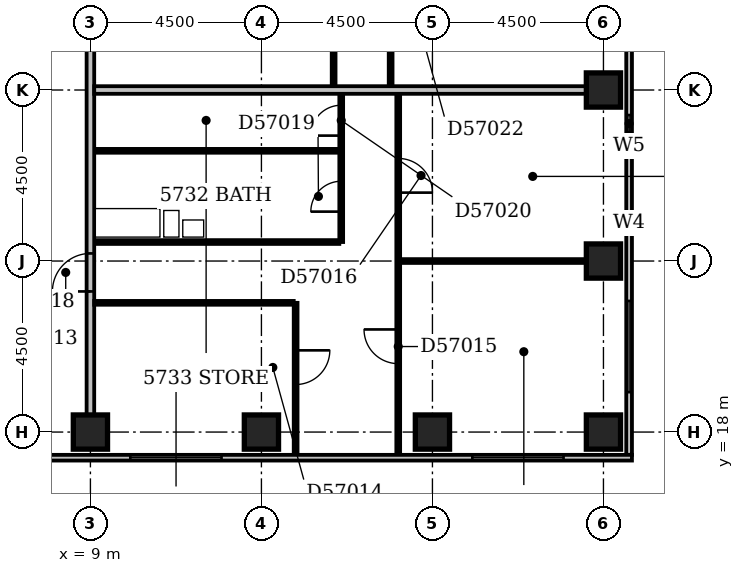
"""IFC4 building model, lengths in metres.
Left out: names, types, materials, properties, quantities, classifications, styles, units other than length and angle.
Written with IfcOpenShell. Run it as: python <this file> out.ifc"""

import sys

from ifc_helpers import new_model, si_unit, direction, frame, frame_2d, origin, origin_2d, place, context, subcontext, project, spatial, rectangle, extrude, element, fill, save


model = new_model("IFC4")
c1 = context("Model", 3, precision=1e-05, world=origin(), true_north=direction((0.0, 1.0)))
c2 = subcontext(c1, "Body", "Model", "MODEL_VIEW")
j1 = project(units=[si_unit("LENGTHUNIT", "METRE"), si_unit("PLANEANGLEUNIT", "RADIAN")], contexts=[c1])
p1 = place(None, origin())
s1 = spatial("IfcSite", under=j1, at=p1, CompositionType="ELEMENT")
p2 = place(p1, origin())
s2 = spatial("IfcBuilding", under=s1, at=p2, CompositionType="ELEMENT")
p3 = place(p2, frame((0.0, 0.0, 222.2)))
s3 = spatial("IfcBuildingStorey", under=s2, at=p3, CompositionType="ELEMENT", Elevation=222.2)
for number, where, z_axis, x_axis in (
    (1, (9.0, 18.0, -0.3), (0.0, 0.0, 1.0), (1.0, 0.0, 0.0)),
    (2, (13.5, 18.0, -0.3), (0.0, 0.0, 1.0), (1.0, 0.0, 0.0)),
    (3, (18.0, 18.0, -0.3), (0.0, 0.0, 1.0), (1.0, 0.0, 0.0)),
    (4, (22.5, 18.0, -0.3), (0.0, 0.0, 1.0), (1.0, 0.0, 0.0)),
    (5, (22.5, 22.5, -0.3), (0.0, 0.0, 1.0), (1.0, 0.0, 0.0)),
    (6, (22.5, 27.0, -0.3), (0.0, 0.0, 1.0), (1.0, 0.0, 0.0)),
):
    element("IfcColumn", number, at=place(p3, frame(where, z_axis=z_axis, x_axis=x_axis)), inside=s3, PredefinedType="COLUMN", context=c2, shape_type="SweptSolid", body=[
        extrude(rectangle(XDim=0.9, YDim=0.9, at=origin_2d()), origin(), (0.0, 0.0, 1.0), 3.6),
    ])
p4 = place(p3, frame((3.9, 17.325, 0.0), z_axis=(0.0, 0.0, 1.0), x_axis=(1.0, 0.0, 0.0)))
e7 = element("IfcWall", 7, at=p4, inside=s3, PredefinedType="STANDARD", context=c2, shape_type="SweptSolid", body=[
    extrude(rectangle(XDim=19.35, YDim=0.15, at=frame_2d((9.675, 0.0))), origin(), (0.0, 0.0, 1.0), 2.7),
])
p5 = place(p4, frame((6.15, 0.0, 0.6)))
e8 = element("IfcOpeningElement", 8, at=p5, cuts=e7, PredefinedType="OPENING", context=c2, shape_type="SweptSolid", body=[
    extrude(rectangle(XDim=2.4, YDim=1.8, at=frame_2d((1.2, 0.9))), frame((0.0, 0.087, 0.0), z_axis=(0.0, -1.0, 0.0), x_axis=(1.0, 0.0, 0.0)), (0.0, 0.0, 1.0), 0.174),
])
p6 = place(p4, frame((15.15, 0.0, 0.6)))
e9 = element("IfcOpeningElement", 9, at=p6, cuts=e7, PredefinedType="OPENING", context=c2, shape_type="SweptSolid", body=[
    extrude(rectangle(XDim=2.4, YDim=1.8, at=frame_2d((1.2, 0.9))), frame((0.0, 0.087, 0.0), z_axis=(0.0, -1.0, 0.0), x_axis=(1.0, 0.0, 0.0)), (0.0, 0.0, 1.0), 0.174),
])
p7 = place(p3, frame((23.175, 17.4, 0.0), z_axis=(0.0, 0.0, 1.0), x_axis=(0.0, 1.0, 0.0)))
e10 = element("IfcWall", 10, at=p7, inside=s3, PredefinedType="STANDARD", context=c2, shape_type="SweptSolid", body=[
    extrude(rectangle(XDim=17.85, YDim=0.15, at=frame_2d((8.925, 0.0))), origin(), (0.0, 0.0, 1.0), 2.7),
])
p8 = place(p7, frame((1.65, 0.0, 0.6)))
e11 = element("IfcOpeningElement", 11, at=p8, cuts=e10, PredefinedType="OPENING", context=c2, shape_type="SweptSolid", body=[
    extrude(rectangle(XDim=2.4, YDim=1.8, at=frame_2d((1.2, 0.9))), frame((0.0, 0.087, 0.0), z_axis=(0.0, -1.0, 0.0), x_axis=(1.0, 0.0, 0.0)), (0.0, 0.0, 1.0), 0.174),
])
p9 = place(p7, frame((5.798, 0.0, 0.6)))
e12 = element("IfcOpeningElement", 12, at=p9, cuts=e10, PredefinedType="OPENING", context=c2, shape_type="SweptSolid", body=[
    extrude(rectangle(XDim=0.6, YDim=1.8, at=frame_2d((0.3, 0.9))), frame((0.0, 0.087, 0.0), z_axis=(0.0, -1.0, 0.0), x_axis=(1.0, 0.0, 0.0)), (0.0, 0.0, 1.0), 0.174),
])
p10 = place(p7, frame((8.491, 0.0, 0.6)))
e13 = element("IfcOpeningElement", 13, at=p10, cuts=e10, PredefinedType="OPENING", context=c2, shape_type="SweptSolid", body=[
    extrude(rectangle(XDim=0.45, YDim=1.8, at=frame_2d((0.225, 0.9))), frame((0.0, 0.087, 0.0), z_axis=(0.0, -1.0, 0.0), x_axis=(1.0, 0.0, 0.0)), (0.0, 0.0, 1.0), 0.174),
])
p11 = place(p7, frame((10.65, 0.0, 0.6)))
e14 = element("IfcOpeningElement", 14, at=p11, cuts=e10, PredefinedType="OPENING", context=c2, shape_type="SweptSolid", body=[
    extrude(rectangle(XDim=2.4, YDim=1.8, at=frame_2d((1.2, 0.9))), frame((0.0, 0.087, 0.0), z_axis=(0.0, -1.0, 0.0), x_axis=(1.0, 0.0, 0.0)), (0.0, 0.0, 1.0), 0.174),
])
p12 = place(p7, frame((15.15, 0.0, 0.6)))
e15 = element("IfcOpeningElement", 15, at=p12, cuts=e10, PredefinedType="OPENING", context=c2, shape_type="SweptSolid", body=[
    extrude(rectangle(XDim=2.4, YDim=1.8, at=frame_2d((1.2, 0.9))), frame((0.0, 0.087, 0.0), z_axis=(0.0, -1.0, 0.0), x_axis=(1.0, 0.0, 0.0)), (0.0, 0.0, 1.0), 0.174),
])
p13 = place(p3, frame((14.4, 17.4, 0.0), z_axis=(0.0, 0.0, 1.0), x_axis=(0.0, 1.0, 0.0)))
e16 = element("IfcWall", 16, at=p13, inside=s3, PredefinedType="PARTITIONING", context=c2, shape_type="SweptSolid", body=[
    extrude(rectangle(XDim=4.0, YDim=0.1, at=frame_2d((2.0, 0.0))), origin(), (0.0, 0.0, 1.0), 3.3),
])
p14 = place(p13, frame((1.85, 0.0, 0.0)))
e17 = element("IfcOpeningElement", 17, at=p14, cuts=e16, PredefinedType="OPENING", context=c2, shape_type="SweptSolid", body=[
    extrude(rectangle(XDim=0.9, YDim=2.1, at=frame_2d((0.45, 1.05))), frame((0.0, 0.062, 0.0), z_axis=(0.0, -1.0, 0.0), x_axis=(1.0, 0.0, 0.0)), (0.0, 0.0, 1.0), 0.124),
])
p15 = place(p3, frame((17.1, 17.4, 0.0), z_axis=(0.0, 0.0, 1.0), x_axis=(0.0, 1.0, 0.0)))
e18 = element("IfcWall", 18, at=p15, inside=s3, PredefinedType="PARTITIONING", context=c2, shape_type="SweptSolid", body=[
    extrude(rectangle(XDim=9.5, YDim=0.1, at=frame_2d((4.75, 0.0))), origin(), (0.0, 0.0, 1.0), 3.3),
])
p16 = place(p15, frame((2.4, 0.0, 0.0)))
e19 = element("IfcOpeningElement", 19, at=p16, cuts=e18, PredefinedType="OPENING", context=c2, shape_type="SweptSolid", body=[
    extrude(rectangle(XDim=0.9, YDim=2.1, at=frame_2d((0.45, 1.05))), frame((0.0, 0.062, 0.0), z_axis=(0.0, -1.0, 0.0), x_axis=(1.0, 0.0, 0.0)), (0.0, 0.0, 1.0), 0.124),
])
p17 = place(p15, frame((6.9, 0.0, 0.0)))
e20 = element("IfcOpeningElement", 20, at=p17, cuts=e18, PredefinedType="OPENING", context=c2, shape_type="SweptSolid", body=[
    extrude(rectangle(XDim=0.9, YDim=2.1, at=frame_2d((0.45, 1.05))), frame((0.0, 0.062, 0.0), z_axis=(0.0, -1.0, 0.0), x_axis=(1.0, 0.0, 0.0)), (0.0, 0.0, 1.0), 0.124),
])
p18 = place(p3, frame((9.0, 18.45, 0.0), z_axis=(0.0, 0.0, 1.0), x_axis=(0.0, 1.0, 0.0)))
e21 = element("IfcWall", 21, at=p18, inside=s3, PredefinedType="PARTITIONING", context=c2, shape_type="SweptSolid", body=[
    extrude(rectangle(XDim=17.55, YDim=0.2, at=frame_2d((8.775, 0.0))), origin(), (0.0, 0.0, 1.0), 3.3),
])
p19 = place(p18, frame((13.85, 0.0, 0.0)))
e22 = element("IfcOpeningElement", 22, at=p19, cuts=e21, PredefinedType="OPENING", context=c2, shape_type="SweptSolid", body=[
    extrude(rectangle(XDim=1.0, YDim=2.1, at=frame_2d((0.5, 1.05))), frame((0.0, 0.112, 0.0), z_axis=(0.0, -1.0, 0.0), x_axis=(1.0, 0.0, 0.0)), (0.0, 0.0, 1.0), 0.224),
])
p20 = place(p18, frame((3.25, 0.0, 0.0)))
e23 = element("IfcOpeningElement", 23, at=p20, cuts=e21, PredefinedType="OPENING", context=c2, shape_type="SweptSolid", body=[
    extrude(rectangle(XDim=1.0, YDim=2.1, at=frame_2d((0.5, 1.05))), frame((0.0, 0.112, 0.0), z_axis=(0.0, -1.0, 0.0), x_axis=(1.0, 0.0, 0.0)), (0.0, 0.0, 1.0), 0.224),
])
p21 = place(p3, frame((9.1, 21.4, 0.0), z_axis=(0.0, 0.0, 1.0), x_axis=(1.0, 0.0, 0.0)))
e24 = element("IfcWall", 24, at=p21, inside=s3, PredefinedType="PARTITIONING", context=c2, shape_type="SweptSolid", body=[
    extrude(rectangle(XDim=5.25, YDim=0.1, at=frame_2d((2.625, 0.0))), origin(), (0.0, 0.0, 1.0), 3.3),
])
p22 = place(p3, frame((17.15, 22.5, 0.0), z_axis=(0.0, 0.0, 1.0), x_axis=(1.0, 0.0, 0.0)))
e25 = element("IfcWall", 25, at=p22, inside=s3, PredefinedType="PARTITIONING", context=c2, shape_type="SweptSolid", body=[
    extrude(rectangle(XDim=4.9, YDim=0.1, at=frame_2d((2.45, 0.0))), origin(), (0.0, 0.0, 1.0), 3.3),
])
p23 = place(p3, frame((9.1, 23.0, 0.0), z_axis=(0.0, 0.0, 1.0), x_axis=(1.0, 0.0, 0.0)))
e26 = element("IfcWall", 26, at=p23, inside=s3, PredefinedType="PLUMBINGWALL", context=c2, shape_type="SweptSolid", body=[
    extrude(rectangle(XDim=6.45, YDim=0.1, at=frame_2d((3.225, 0.0))), origin(), (0.0, 0.0, 1.0), 3.3),
])
p24 = place(p3, frame((15.6, 23.0, 0.0), z_axis=(0.0, 0.0, 1.0), x_axis=(0.0, 1.0, 0.0)))
e27 = element("IfcWall", 27, at=p24, inside=s3, PredefinedType="PARTITIONING", context=c2, shape_type="SweptSolid", body=[
    extrude(rectangle(XDim=3.9, YDim=0.1, at=frame_2d((1.95, 0.0))), origin(), (0.0, 0.0, 1.0), 3.3),
])
p25 = place(p24, frame((0.8, 0.0, 0.0)))
e28 = element("IfcOpeningElement", 28, at=p25, cuts=e27, PredefinedType="OPENING", context=c2, shape_type="SweptSolid", body=[
    extrude(rectangle(XDim=0.8, YDim=2.1, at=frame_2d((0.4, 1.05))), frame((0.0, 0.062, 0.0), z_axis=(0.0, -1.0, 0.0), x_axis=(1.0, 0.0, 0.0)), (0.0, 0.0, 1.0), 0.124),
])
p26 = place(p24, frame((2.8, 0.0, 0.0)))
e29 = element("IfcOpeningElement", 29, at=p26, cuts=e27, PredefinedType="OPENING", context=c2, shape_type="SweptSolid", body=[
    extrude(rectangle(XDim=0.8, YDim=2.1, at=frame_2d((0.4, 1.05))), frame((0.0, 0.062, 0.0), z_axis=(0.0, -1.0, 0.0), x_axis=(1.0, 0.0, 0.0)), (0.0, 0.0, 1.0), 0.124),
])
p27 = place(p3, frame((9.1, 25.4, 0.0), z_axis=(0.0, 0.0, 1.0), x_axis=(1.0, 0.0, 0.0)))
e30 = element("IfcWall", 30, at=p27, inside=s3, PredefinedType="PLUMBINGWALL", context=c2, shape_type="SweptSolid", body=[
    extrude(rectangle(XDim=6.45, YDim=0.1, at=frame_2d((3.225, 0.0))), origin(), (0.0, 0.0, 1.0), 3.3),
])
p28 = place(p3, frame((9.1, 27.0, 0.0), z_axis=(0.0, 0.0, 1.0), x_axis=(1.0, 0.0, 0.0)))
e31 = element("IfcWall", 31, at=p28, inside=s3, PredefinedType="PARTITIONING", context=c2, shape_type="SweptSolid", body=[
    extrude(rectangle(XDim=12.95, YDim=0.2, at=frame_2d((6.475, 0.0))), origin(), (0.0, 0.0, 1.0), 2.7),
])
p29 = place(p3, frame((15.4, 27.1, 0.0), z_axis=(0.0, 0.0, 1.0), x_axis=(0.0, 1.0, 0.0)))
e32 = element("IfcWall", 32, at=p29, inside=s3, PredefinedType="PARTITIONING", context=c2, shape_type="SweptSolid", body=[
    extrude(rectangle(XDim=4.9, YDim=0.1, at=frame_2d((2.45, 0.0))), origin(), (0.0, 0.0, 1.0), 3.3),
])
p30 = place(p29, frame((1.95, 0.0, 0.0)))
e33 = element("IfcOpeningElement", 33, at=p30, cuts=e32, PredefinedType="OPENING", context=c2, shape_type="SweptSolid", body=[
    extrude(rectangle(XDim=0.9, YDim=2.1, at=frame_2d((0.45, 1.05))), frame((0.0, 0.062, 0.0), z_axis=(0.0, -1.0, 0.0), x_axis=(1.0, 0.0, 0.0)), (0.0, 0.0, 1.0), 0.124),
])
p31 = place(p3, frame((16.9, 27.1, 0.0), z_axis=(0.0, 0.0, 1.0), x_axis=(0.0, 1.0, 0.0)))
e34 = element("IfcWall", 34, at=p31, inside=s3, PredefinedType="PARTITIONING", context=c2, shape_type="SweptSolid", body=[
    extrude(rectangle(XDim=8.8, YDim=0.1, at=frame_2d((4.4, 0.0))), origin(), (0.0, 0.0, 1.0), 3.3),
])
p32 = place(p31, frame((1.7, 0.0, 0.0)))
e35 = element("IfcOpeningElement", 35, at=p32, cuts=e34, PredefinedType="OPENING", context=c2, shape_type="SweptSolid", body=[
    extrude(rectangle(XDim=0.9, YDim=2.1, at=frame_2d((0.45, 1.05))), frame((0.0, 0.062, 0.0), z_axis=(0.0, -1.0, 0.0), x_axis=(1.0, 0.0, 0.0)), (0.0, 0.0, 1.0), 0.124),
])
p33 = place(p31, frame((5.05, 0.0, 0.0)))
e36 = element("IfcOpeningElement", 36, at=p33, cuts=e34, PredefinedType="OPENING", context=c2, shape_type="SweptSolid", body=[
    extrude(rectangle(XDim=0.9, YDim=2.1, at=frame_2d((0.45, 1.05))), frame((0.0, 0.062, 0.0), z_axis=(0.0, -1.0, 0.0), x_axis=(1.0, 0.0, 0.0)), (0.0, 0.0, 1.0), 0.124),
])
p34 = place(p5, origin())
e37 = element("IfcWindow", 37, at=p34, inside=s3, PartitioningType="SINGLE_PANEL", PredefinedType="WINDOW", context=c2, shape_type="SweptSolid", body=[
    extrude(rectangle(XDim=2.4, YDim=1.8, at=frame_2d((1.2, 0.9))), frame((0.0, 0.03, 0.0), z_axis=(0.0, -1.0, 0.0), x_axis=(1.0, 0.0, 0.0)), (0.0, 0.0, 1.0), 0.06),
])
fill(e8, e37)
p35 = place(p6, origin())
e38 = element("IfcWindow", 38, at=p35, inside=s3, PartitioningType="SINGLE_PANEL", PredefinedType="WINDOW", context=c2, shape_type="SweptSolid", body=[
    extrude(rectangle(XDim=2.4, YDim=1.8, at=frame_2d((1.2, 0.9))), frame((0.0, 0.03, 0.0), z_axis=(0.0, -1.0, 0.0), x_axis=(1.0, 0.0, 0.0)), (0.0, 0.0, 1.0), 0.06),
])
fill(e9, e38)
p36 = place(p8, origin())
e39 = element("IfcWindow", 39, at=p36, inside=s3, PartitioningType="SINGLE_PANEL", PredefinedType="WINDOW", context=c2, shape_type="SweptSolid", body=[
    extrude(rectangle(XDim=2.4, YDim=1.8, at=frame_2d((1.2, 0.9))), frame((0.0, 0.03, 0.0), z_axis=(0.0, -1.0, 0.0), x_axis=(1.0, 0.0, 0.0)), (0.0, 0.0, 1.0), 0.06),
])
fill(e11, e39)
p37 = place(p9, origin())
e40 = element("IfcWindow", 40, at=p37, inside=s3, PartitioningType="SINGLE_PANEL", PredefinedType="WINDOW", context=c2, shape_type="SweptSolid", body=[
    extrude(rectangle(XDim=0.6, YDim=1.8, at=frame_2d((0.3, 0.9))), frame((0.0, 0.03, 0.0), z_axis=(0.0, -1.0, 0.0), x_axis=(1.0, 0.0, 0.0)), (0.0, 0.0, 1.0), 0.06),
])
fill(e12, e40)
p38 = place(p10, origin())
e41 = element("IfcWindow", 41, at=p38, inside=s3, PartitioningType="SINGLE_PANEL", PredefinedType="WINDOW", context=c2, shape_type="SweptSolid", body=[
    extrude(rectangle(XDim=0.45, YDim=1.8, at=frame_2d((0.225, 0.9))), frame((0.0, 0.03, 0.0), z_axis=(0.0, -1.0, 0.0), x_axis=(1.0, 0.0, 0.0)), (0.0, 0.0, 1.0), 0.06),
])
fill(e13, e41)
p39 = place(p14, origin())
e42 = element("IfcDoor", 42, at=p39, inside=s3, OperationType="SINGLE_SWING_RIGHT", PredefinedType="DOOR", context=c2, shape_type="SweptSolid", body=[
    extrude(rectangle(XDim=0.9, YDim=2.1, at=frame_2d((0.45, 1.05))), frame((0.0, 0.025, 0.0), z_axis=(0.0, -1.0, 0.0), x_axis=(1.0, 0.0, 0.0)), (0.0, 0.0, 1.0), 0.05),
])
fill(e17, e42)
p40 = place(p16, frame((0.9, 0.0, 0.0), z_axis=(0.0, 0.0, 1.0), x_axis=(-1.0, 0.0, 0.0)))
e43 = element("IfcDoor", 43, at=p40, inside=s3, OperationType="SINGLE_SWING_LEFT", PredefinedType="DOOR", context=c2, shape_type="SweptSolid", body=[
    extrude(rectangle(XDim=0.9, YDim=2.1, at=frame_2d((0.45, 1.05))), frame((0.0, 0.025, 0.0), z_axis=(0.0, -1.0, 0.0), x_axis=(1.0, 0.0, 0.0)), (0.0, 0.0, 1.0), 0.05),
])
fill(e19, e43)
p41 = place(p17, frame((0.9, 0.0, 0.0), z_axis=(0.0, 0.0, 1.0), x_axis=(-1.0, 0.0, 0.0)))
e44 = element("IfcDoor", 44, at=p41, inside=s3, OperationType="SINGLE_SWING_RIGHT", PredefinedType="DOOR", context=c2, shape_type="SweptSolid", body=[
    extrude(rectangle(XDim=0.9, YDim=2.1, at=frame_2d((0.45, 1.05))), frame((0.0, 0.025, 0.0), z_axis=(0.0, -1.0, 0.0), x_axis=(1.0, 0.0, 0.0)), (0.0, 0.0, 1.0), 0.05),
])
fill(e20, e44)
p42 = place(p20, origin())
e45 = element("IfcDoor", 45, at=p42, inside=s3, OperationType="SINGLE_SWING_LEFT", PredefinedType="DOOR", context=c2, shape_type="SweptSolid", body=[
    extrude(rectangle(XDim=1.0, YDim=2.1, at=frame_2d((0.5, 1.05))), frame((0.0, 0.025, 0.0), z_axis=(0.0, -1.0, 0.0), x_axis=(1.0, 0.0, 0.0)), (0.0, 0.0, 1.0), 0.05),
])
fill(e23, e45)
p43 = place(p25, origin())
e46 = element("IfcDoor", 46, at=p43, inside=s3, OperationType="SINGLE_SWING_LEFT", PredefinedType="DOOR", context=c2, shape_type="SweptSolid", body=[
    extrude(rectangle(XDim=0.8, YDim=2.1, at=frame_2d((0.4, 1.05))), frame((0.0, 0.025, 0.0), z_axis=(0.0, -1.0, 0.0), x_axis=(1.0, 0.0, 0.0)), (0.0, 0.0, 1.0), 0.05),
])
fill(e28, e46)
p44 = place(p26, origin())
e47 = element("IfcDoor", 47, at=p44, inside=s3, OperationType="SINGLE_SWING_LEFT", PredefinedType="DOOR", context=c2, shape_type="SweptSolid", body=[
    extrude(rectangle(XDim=0.8, YDim=2.1, at=frame_2d((0.4, 1.05))), frame((0.0, 0.025, 0.0), z_axis=(0.0, -1.0, 0.0), x_axis=(1.0, 0.0, 0.0)), (0.0, 0.0, 1.0), 0.05),
])
fill(e29, e47)
save(model, sys.argv[1])
